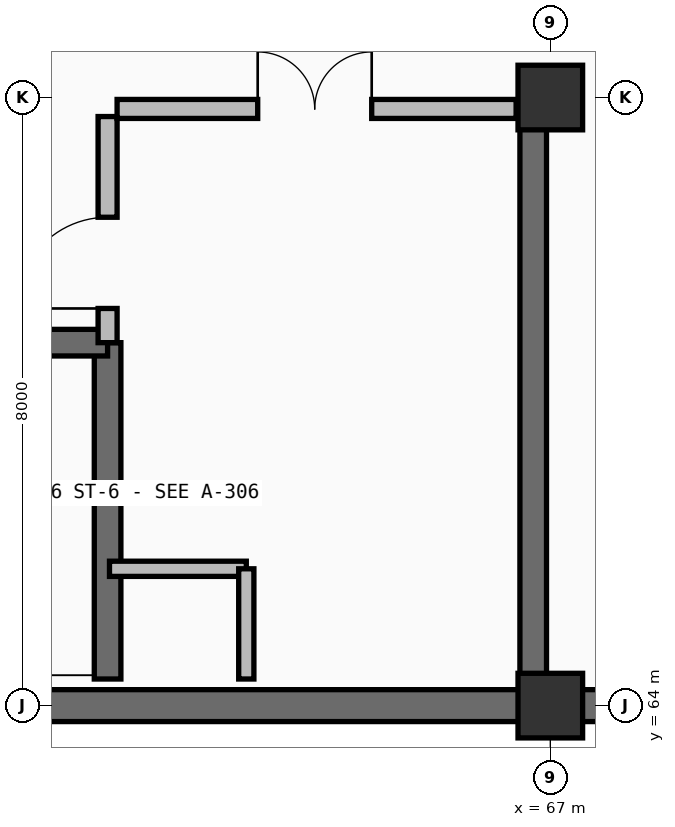
"""IFC4 building model, lengths in metres.
Left out: names, types, materials, properties, quantities, classifications, styles, units other than length and angle.
Written with IfcOpenShell. Run it as: python <this file> out.ifc"""

import sys

from ifc_helpers import new_model, si_unit, direction, frame, frame_2d, origin, origin_2d, place, context, subcontext, project, spatial, rectangle, extrude, element, fill, save


model = new_model("IFC4")
c1 = context("Model", 3, precision=1e-05, world=origin(), true_north=direction((0.0, 1.0)))
c2 = subcontext(c1, "Body", "Model", "MODEL_VIEW")
j1 = project(units=[si_unit("LENGTHUNIT", "METRE"), si_unit("PLANEANGLEUNIT", "RADIAN")], contexts=[c1])
p1 = place(None, origin())
s1 = spatial("IfcSite", under=j1, at=p1, CompositionType="ELEMENT")
p2 = place(p1, origin())
s2 = spatial("IfcBuilding", under=s1, at=p2, CompositionType="ELEMENT")
p3 = place(p2, frame((0.0, 0.0, -4.5)))
s3 = spatial("IfcBuildingStorey", under=s2, at=p3, CompositionType="ELEMENT", Elevation=-4.5)
for number, where, z_axis, x_axis in (
    (1, (67.0, 64.0, -0.6), (0.0, 0.0, 1.0), (1.0, 0.0, 0.0)),
    (2, (67.0, 72.0, -0.6), (0.0, 0.0, 1.0), (1.0, 0.0, 0.0)),
):
    element("IfcColumn", number, at=place(p3, frame(where, z_axis=z_axis, x_axis=x_axis)), inside=s3, PredefinedType="COLUMN", context=c2, shape_type="SweptSolid", body=[
        extrude(rectangle(XDim=0.85, YDim=0.85, at=origin_2d()), origin(), (0.0, 0.0, 1.0), 5.1),
    ])
for number, where, z_axis, x_axis in (
    (3, (75.0, 64.0, 0.0), (0.0, 0.0, 1.0), (-1.0, 0.0, 0.0)),
    (4, (67.0, 64.0, 0.0), (0.0, 0.0, 1.0), (-1.0, 0.0, 0.0)),
):
    element("IfcWall", number, at=place(p3, frame(where, z_axis=z_axis, x_axis=x_axis)), inside=s3, PredefinedType="USERDEFINED", context=c2, shape_type="SweptSolid", body=[
        extrude(rectangle(XDim=8.0, YDim=0.42, at=frame_2d((4.0, 0.0))), origin(), (0.0, 0.0, 1.0), 4.5),
    ])
p4 = place(p3, frame((61.175, 64.35, 0.0), z_axis=(0.0, 0.0, 1.0), x_axis=(0.0, 1.0, 0.0)))
e5 = element("IfcWall", 5, at=p4, inside=s3, PredefinedType="SHEAR", context=c2, shape_type="SweptSolid", body=[
    extrude(rectangle(XDim=4.425, YDim=0.35, at=frame_2d((2.212, 0.0))), origin(), (0.0, 0.0, 1.0), 4.2),
])
p5 = place(p3, frame((66.775, 64.2, 0.0), z_axis=(0.0, 0.0, 1.0), x_axis=(0.0, 1.0, 0.0)))
e6 = element("IfcWall", 6, at=p5, inside=s3, PredefinedType="SHEAR", context=c2, shape_type="SweptSolid", body=[
    extrude(rectangle(XDim=7.6, YDim=0.35, at=frame_2d((3.8, 0.0))), origin(), (0.0, 0.0, 1.0), 4.2),
])
p6 = place(p3, frame((61.2, 65.8, 0.0), z_axis=(0.0, 0.0, 1.0), x_axis=(1.0, 0.0, 0.0)))
e7 = element("IfcWall", 7, at=p6, inside=s3, PredefinedType="PARTITIONING", context=c2, shape_type="SweptSolid", body=[
    extrude(rectangle(XDim=1.8, YDim=0.2, at=frame_2d((0.9, 0.0))), origin(), (0.0, 0.0, 1.0), 4.2),
])
p7 = place(p3, frame((63.0, 64.35, 0.0), z_axis=(0.0, 0.0, 1.0), x_axis=(0.0, 1.0, 0.0)))
e8 = element("IfcWall", 8, at=p7, inside=s3, PredefinedType="PARTITIONING", context=c2, shape_type="SweptSolid", body=[
    extrude(rectangle(XDim=1.45, YDim=0.2, at=frame_2d((0.725, 0.0))), origin(), (0.0, 0.0, 1.0), 4.2),
])
p8 = place(p3, frame((51.35, 68.775, 0.0), z_axis=(0.0, 0.0, 1.0), x_axis=(1.0, 0.0, 0.0)))
e9 = element("IfcWall", 9, at=p8, inside=s3, PredefinedType="SHEAR", context=c2, shape_type="SweptSolid", body=[
    extrude(rectangle(XDim=9.825, YDim=0.35, at=frame_2d((4.913, 0.0))), origin(), (0.0, 0.0, 1.0), 4.2),
])
p9 = place(p8, frame((0.4, 0.0, 0.0)))
e10 = element("IfcOpeningElement", 10, at=p9, cuts=e9, PredefinedType="OPENING", context=c2, shape_type="SweptSolid", body=[
    extrude(rectangle(XDim=1.85, YDim=2.25, at=frame_2d((0.925, 1.125))), frame((0.0, 0.185, 0.0), z_axis=(0.0, -1.0, 0.0), x_axis=(1.0, 0.0, 0.0)), (0.0, 0.0, 1.0), 0.37),
])
p10 = place(p3, frame((61.175, 68.775, 0.0), z_axis=(0.0, 0.0, 1.0), x_axis=(0.0, 1.0, 0.0)))
e11 = element("IfcWall", 11, at=p10, inside=s3, PredefinedType="PARTITIONING", context=c2, shape_type="SweptSolid", body=[
    extrude(rectangle(XDim=2.975, YDim=0.25, at=frame_2d((1.488, 0.0))), origin(), (0.0, 0.0, 1.0), 4.2),
])
p11 = place(p10, frame((0.45, 0.0, 0.0)))
e12 = element("IfcOpeningElement", 12, at=p11, cuts=e11, PredefinedType="OPENING", context=c2, shape_type="SweptSolid", body=[
    extrude(rectangle(XDim=1.2, YDim=2.2, at=frame_2d((0.6, 1.1))), frame((0.0, 0.135, 0.0), z_axis=(0.0, -1.0, 0.0), x_axis=(1.0, 0.0, 0.0)), (0.0, 0.0, 1.0), 0.27),
])
p12 = place(p3, frame((61.3, 71.85, 0.0), z_axis=(0.0, 0.0, 1.0), x_axis=(1.0, 0.0, 0.0)))
e13 = element("IfcWall", 13, at=p12, inside=s3, PredefinedType="PARTITIONING", context=c2, shape_type="SweptSolid", body=[
    extrude(rectangle(XDim=5.25, YDim=0.25, at=frame_2d((2.625, 0.0))), origin(), (0.0, 0.0, 1.0), 3.435),
])
p13 = place(p12, frame((1.85, 0.0, 0.0)))
e14 = element("IfcOpeningElement", 14, at=p13, cuts=e13, PredefinedType="OPENING", context=c2, shape_type="SweptSolid", body=[
    extrude(rectangle(XDim=1.5, YDim=2.2, at=frame_2d((0.75, 1.1))), frame((0.0, 0.135, 0.0), z_axis=(0.0, -1.0, 0.0), x_axis=(1.0, 0.0, 0.0)), (0.0, 0.0, 1.0), 0.27),
])
p14 = place(p11, origin())
e15 = element("IfcDoor", 15, at=p14, inside=s3, OperationType="SINGLE_SWING_LEFT", PredefinedType="DOOR", context=c2, shape_type="SweptSolid", body=[
    extrude(rectangle(XDim=1.2, YDim=2.2, at=frame_2d((0.6, 1.1))), frame((0.0, 0.025, 0.0), z_axis=(0.0, -1.0, 0.0), x_axis=(1.0, 0.0, 0.0)), (0.0, 0.0, 1.0), 0.05),
])
fill(e12, e15)
p15 = place(p13, origin())
e16 = element("IfcDoor", 16, at=p15, inside=s3, OperationType="DOUBLE_DOOR_SINGLE_SWING", PredefinedType="DOOR", context=c2, shape_type="SweptSolid", body=[
    extrude(rectangle(XDim=1.5, YDim=2.2, at=frame_2d((0.75, 1.1))), frame((0.0, 0.025, 0.0), z_axis=(0.0, -1.0, 0.0), x_axis=(1.0, 0.0, 0.0)), (0.0, 0.0, 1.0), 0.05),
])
fill(e14, e16)
save(model, sys.argv[1])
